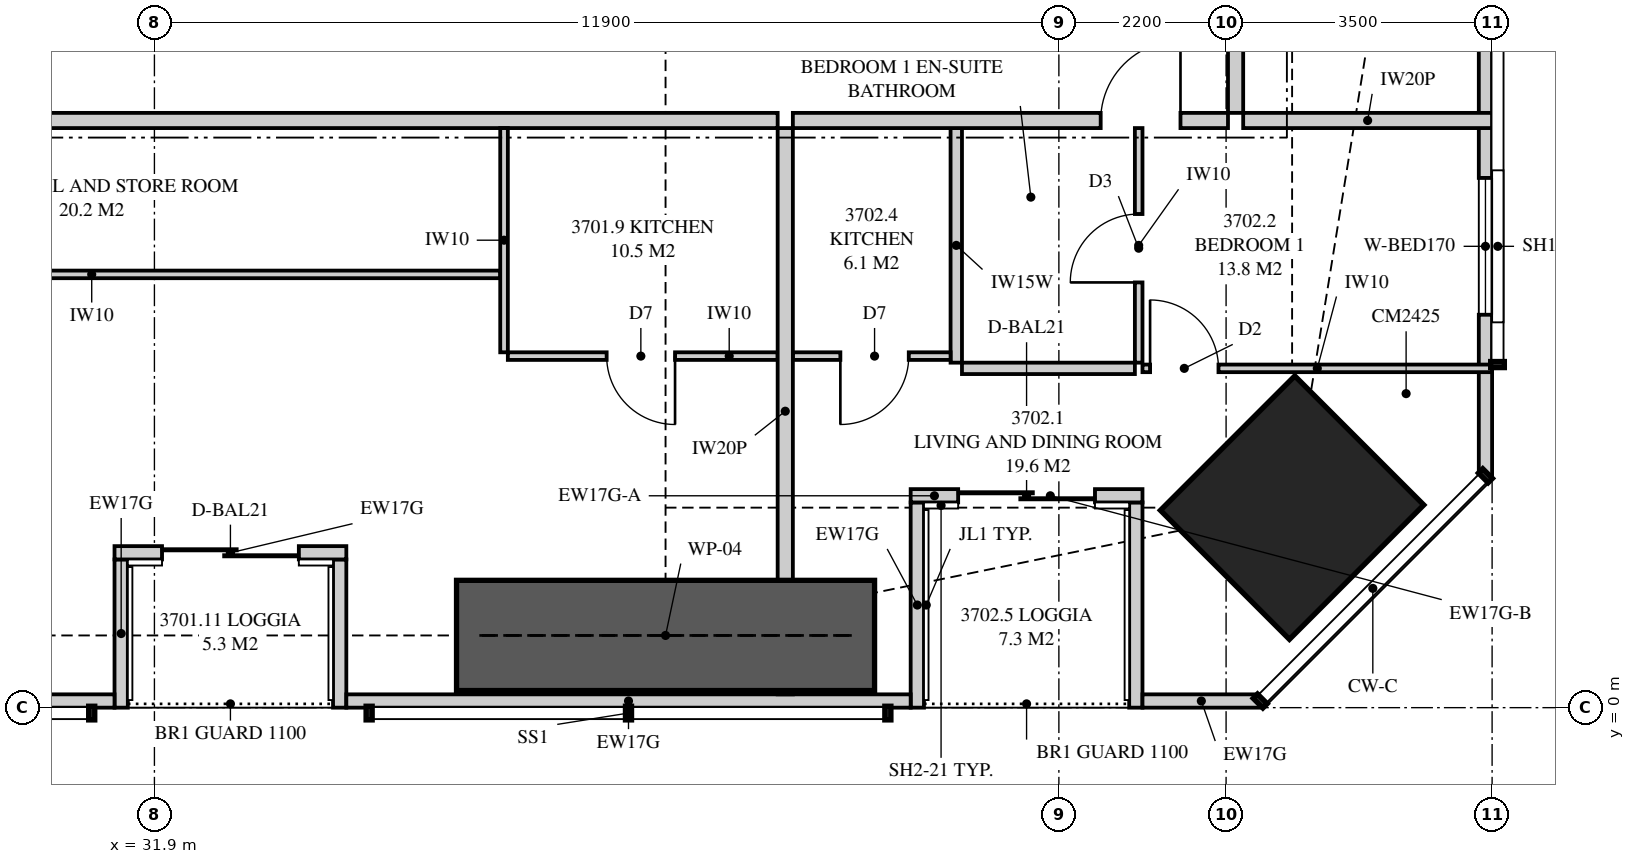
"""IFC4 building model, lengths in metres.
Left out: names, types, materials, properties, quantities, classifications, styles, units other than length and angle.
Written with IfcOpenShell. Run it as: python <this file> out.ifc"""

import sys

from ifc_helpers import new_model, si_unit, direction, frame, frame_2d, origin, origin_2d, place, context, subcontext, project, spatial, polyline, rectangle, outline, extrude, element, fill, save


model = new_model("IFC4")
c1 = context("Model", 3, precision=1e-05, world=origin(), true_north=direction((0.0, 1.0)))
c2 = subcontext(c1, "Body", "Model", "MODEL_VIEW")
j1 = project(units=[si_unit("LENGTHUNIT", "METRE"), si_unit("PLANEANGLEUNIT", "RADIAN")], contexts=[c1])
p1 = place(None, origin())
s1 = spatial("IfcSite", under=j1, at=p1, CompositionType="ELEMENT")
p2 = place(p1, origin())
s2 = spatial("IfcBuilding", under=s1, at=p2, CompositionType="ELEMENT")
p3 = place(p2, frame((0.0, 0.0, 135.0)))
s3 = spatial("IfcBuildingStorey", under=s2, at=p3, CompositionType="ELEMENT", Elevation=135.0)
p4 = place(p3, frame((46.869, 2.631, 0.0), z_axis=(0.0, 0.0, 1.0), x_axis=(-0.707106781187, 0.707106781187, 0.0)))
e1 = element("IfcColumn", 1, at=p4, inside=s3, PredefinedType="COLUMN", context=c2, shape_type="SweptSolid", body=[
    extrude(rectangle(XDim=2.4, YDim=2.5, at=origin_2d()), origin(), (0.0, 0.0, 1.0), 3.35),
])
p5 = place(p3, frame((9.051, 0.087, 0.0), z_axis=(0.0, 0.0, 1.0), x_axis=(1.0, 0.0, 0.0)))
e2 = element("IfcWall", 2, at=p5, inside=s3, PredefinedType="SOLIDWALL", context=c2, shape_type="SweptSolid", body=[
    extrude(outline(polyline([(0.0, 0.0), (22.324, 0.0), (22.324, 2.15), (7.824, 2.15), (7.824, 3.11), (7.666, 3.11), (7.666, 2.15), (7.62, 2.15), (7.62, 3.11), (0.0, 3.11), (0.0, 0.0)])), frame((0.0, 0.087, 0.0), z_axis=(0.0, -1.0, 0.0), x_axis=(1.0, 0.0, 0.0)), (0.0, 0.0, 1.0), 0.175),
])
p6 = place(p5, frame((3.134, 0.0, 0.4)))
e3 = element("IfcOpeningElement", 3, at=p6, cuts=e2, PredefinedType="OPENING", context=c2, shape_type="SweptSolid", body=[
    extrude(rectangle(XDim=1.8, YDim=1.7, at=frame_2d((0.9, 0.85))), frame((0.0, 0.097, 0.0), z_axis=(0.0, -1.0, 0.0), x_axis=(1.0, 0.0, 0.0)), (0.0, 0.0, 1.0), 0.195),
])
p7 = place(p5, frame((10.706, 0.0, 0.4)))
e4 = element("IfcOpeningElement", 4, at=p7, cuts=e2, PredefinedType="OPENING", context=c2, shape_type="SweptSolid", body=[
    extrude(rectangle(XDim=1.8, YDim=1.7, at=frame_2d((0.9, 0.85))), frame((0.0, 0.097, 0.0), z_axis=(0.0, -1.0, 0.0), x_axis=(1.0, 0.0, 0.0)), (0.0, 0.0, 1.0), 0.195),
])
p8 = place(p5, frame((13.874, 0.0, 0.4)))
e5 = element("IfcOpeningElement", 5, at=p8, cuts=e2, PredefinedType="OPENING", context=c2, shape_type="SweptSolid", body=[
    extrude(rectangle(XDim=1.8, YDim=1.7, at=frame_2d((0.9, 0.85))), frame((0.0, 0.097, 0.0), z_axis=(0.0, -1.0, 0.0), x_axis=(1.0, 0.0, 0.0)), (0.0, 0.0, 1.0), 0.195),
])
p9 = place(p3, frame((34.425, 0.087, 0.0), z_axis=(0.0, 0.0, 1.0), x_axis=(1.0, 0.0, 0.0)))
e6 = element("IfcWall", 6, at=p9, inside=s3, PredefinedType="SOLIDWALL", context=c2, shape_type="SweptSolid", body=[
    extrude(outline(polyline([(0.0, 0.0), (7.425, 0.0), (7.425, 3.11), (4.403, 3.11), (4.403, 2.15), (4.358, 2.15), (4.358, 3.11), (4.2, 3.11), (4.2, 2.15), (0.0, 2.15), (0.0, 0.0)])), frame((0.0, 0.087, 0.0), z_axis=(0.0, -1.0, 0.0), x_axis=(1.0, 0.0, 0.0)), (0.0, 0.0, 1.0), 0.175),
])
p10 = place(p3, frame((44.9, 0.087, 0.0), z_axis=(0.0, 0.0, 1.0), x_axis=(1.0, 0.0, 0.0)))
e7 = element("IfcWall", 7, at=p10, inside=s3, PredefinedType="SOLIDWALL", context=c2, shape_type="SweptSolid", body=[
    extrude(rectangle(XDim=1.549, YDim=0.175, at=frame_2d((0.774, 0.0))), origin(), (0.0, 0.0, 1.0), 3.11),
])
p11 = place(p3, frame((31.375, 2.038, 0.0), z_axis=(0.0, 0.0, 1.0), x_axis=(1.0, 0.0, 0.0)))
e8 = element("IfcWall", 8, at=p11, inside=s3, PredefinedType="SOLIDWALL", context=c2, shape_type="SweptSolid", body=[
    extrude(rectangle(XDim=3.05, YDim=0.175, at=frame_2d((1.525, 0.0))), origin(), (0.0, 0.0, 1.0), 3.11),
])
p12 = place(p11, frame((0.625, 0.0, 0.0)))
e9 = element("IfcOpeningElement", 9, at=p12, cuts=e8, PredefinedType="OPENING", context=c2, shape_type="SweptSolid", body=[
    extrude(rectangle(XDim=1.8, YDim=2.1, at=frame_2d((0.9, 1.05))), frame((0.0, 0.097, 0.0), z_axis=(0.0, -1.0, 0.0), x_axis=(1.0, 0.0, 0.0)), (0.0, 0.0, 1.0), 0.195),
])
for number, where, z_axis, x_axis in (
    (10, (31.462, 0.0, 0.0), (0.0, 0.0, 1.0), (0.0, 1.0, 0.0)),
    (11, (34.337, 0.0, 0.0), (0.0, 0.0, 1.0), (0.0, 1.0, 0.0)),
):
    element("IfcWall", number, at=place(p3, frame(where, z_axis=z_axis, x_axis=x_axis)), inside=s3, PredefinedType="SOLIDWALL", context=c2, shape_type="SweptSolid", body=[
        extrude(outline(polyline([(0.0, 0.0), (1.95, 0.0), (1.95, 3.11), (1.75, 3.11), (1.75, 2.15), (0.15, 2.15), (0.15, 3.11), (0.0, 3.11), (0.0, 0.0)])), frame((0.0, 0.087, 0.0), z_axis=(0.0, -1.0, 0.0), x_axis=(1.0, 0.0, 0.0)), (0.0, 0.0, 1.0), 0.175),
    ])
p13 = place(p3, frame((41.85, 2.788, 0.0), z_axis=(0.0, 0.0, 1.0), x_axis=(1.0, 0.0, 0.0)))
e12 = element("IfcWall", 12, at=p13, inside=s3, PredefinedType="SOLIDWALL", context=c2, shape_type="SweptSolid", body=[
    extrude(rectangle(XDim=0.625, YDim=0.175, at=frame_2d((0.312, 0.0))), origin(), (0.0, 0.0, 1.0), 2.51),
])
p14 = place(p3, frame((42.475, 2.788, 0.0), z_axis=(0.0, 0.0, 1.0), x_axis=(1.0, 0.0, 0.0)))
e13 = element("IfcWall", 13, at=p14, inside=s3, PredefinedType="SOLIDWALL", context=c2, shape_type="SweptSolid", body=[
    extrude(rectangle(XDim=2.425, YDim=0.175, at=frame_2d((1.212, 0.0))), origin(), (0.0, 0.0, 1.0), 2.15),
])
p15 = place(p14, origin())
e14 = element("IfcOpeningElement", 14, at=p15, cuts=e13, PredefinedType="OPENING", context=c2, shape_type="SweptSolid", body=[
    extrude(rectangle(XDim=1.8, YDim=2.1, at=frame_2d((0.9, 1.05))), frame((0.0, 0.097, 0.0), z_axis=(0.0, -1.0, 0.0), x_axis=(1.0, 0.0, 0.0)), (0.0, 0.0, 1.0), 0.195),
])
p16 = place(p3, frame((41.938, 0.0, 0.0), z_axis=(0.0, 0.0, 1.0), x_axis=(0.0, 1.0, 0.0)))
e15 = element("IfcWall", 15, at=p16, inside=s3, PredefinedType="SOLIDWALL", context=c2, shape_type="SweptSolid", body=[
    extrude(outline(polyline([(0.0, 0.0), (2.7, 0.0), (2.7, 2.51), (2.46, 2.51), (2.46, 2.15), (0.791, 2.15), (0.791, 3.11), (0.0, 3.11), (0.0, 0.0)])), frame((0.0, 0.087, 0.0), z_axis=(0.0, -1.0, 0.0), x_axis=(1.0, 0.0, 0.0)), (0.0, 0.0, 1.0), 0.175),
])
p17 = place(p3, frame((44.812, 0.0, 0.0), z_axis=(0.0, 0.0, 1.0), x_axis=(0.0, 1.0, 0.0)))
e16 = element("IfcWall", 16, at=p17, inside=s3, PredefinedType="SOLIDWALL", context=c2, shape_type="SweptSolid", body=[
    extrude(outline(polyline([(0.0, 0.0), (2.7, 0.0), (2.7, 2.15), (1.378, 2.15), (1.378, 3.11), (0.0, 3.11), (0.0, 0.0)])), frame((0.0, 0.087, 0.0), z_axis=(0.0, -1.0, 0.0), x_axis=(1.0, 0.0, 0.0)), (0.0, 0.0, 1.0), 0.175),
])
p18 = place(p3, frame((49.413, 3.051, 0.0), z_axis=(0.0, 0.0, 1.0), x_axis=(0.0, 1.0, 0.0)))
e17 = element("IfcWall", 17, at=p18, inside=s3, PredefinedType="SOLIDWALL", context=c2, shape_type="SweptSolid", body=[
    extrude(outline(polyline([(0.0, 0.0), (31.897, 0.0), (31.897, 3.11), (22.167, 3.11), (22.167, 2.15), (22.074, 2.15), (22.074, 3.11), (21.949, 3.11), (21.949, 2.15), (9.949, 2.15), (9.949, 3.11), (9.823, 3.11), (9.823, 2.15), (9.73, 2.15), (9.73, 3.11), (0.0, 3.11), (0.0, 0.0)])), frame((0.0, 0.087, 0.0), z_axis=(0.0, -1.0, 0.0), x_axis=(1.0, 0.0, 0.0)), (0.0, 0.0, 1.0), 0.175),
])
p19 = place(p18, frame((2.118, 0.0, 0.4)))
e18 = element("IfcOpeningElement", 18, at=p19, cuts=e17, PredefinedType="OPENING", context=c2, shape_type="SweptSolid", body=[
    extrude(rectangle(XDim=1.8, YDim=1.7, at=frame_2d((0.9, 0.85))), frame((0.0, 0.097, 0.0), z_axis=(0.0, -1.0, 0.0), x_axis=(1.0, 0.0, 0.0)), (0.0, 0.0, 1.0), 0.195),
])
p20 = place(p18, frame((14.849, 0.0, 0.4)))
e19 = element("IfcOpeningElement", 19, at=p20, cuts=e17, PredefinedType="OPENING", context=c2, shape_type="SweptSolid", body=[
    extrude(rectangle(XDim=1.2, YDim=1.7, at=frame_2d((0.6, 0.85))), frame((0.0, 0.097, 0.0), z_axis=(0.0, -1.0, 0.0), x_axis=(1.0, 0.0, 0.0)), (0.0, 0.0, 1.0), 0.195),
])
p21 = place(p18, frame((28.51, 0.0, 0.4)))
e20 = element("IfcOpeningElement", 20, at=p21, cuts=e17, PredefinedType="OPENING", context=c2, shape_type="SweptSolid", body=[
    extrude(rectangle(XDim=1.2, YDim=1.7, at=frame_2d((0.6, 0.85))), frame((0.0, 0.097, 0.0), z_axis=(0.0, -1.0, 0.0), x_axis=(1.0, 0.0, 0.0)), (0.0, 0.0, 1.0), 0.195),
])
p22 = place(p3, frame((40.2, 0.175, 0.0), z_axis=(0.0, 0.0, 1.0), x_axis=(0.0, 1.0, 0.0)))
e21 = element("IfcWall", 21, at=p22, inside=s3, PredefinedType="PARTITIONING", context=c2, shape_type="SweptSolid", body=[
    extrude(outline(polyline([(0.167, 3.11), (0.0, 3.11), (0.0, 0.0), (0.529, 0.0), (0.529, 0.427), (1.021, 0.427), (1.021, 0.0), (7.45, 0.0), (7.45, 3.11), (3.766, 3.11), (3.766, 2.51), (2.025, 2.51), (2.025, 2.15), (1.021, 2.15), (1.021, 1.723), (0.529, 1.723), (0.529, 2.15), (0.167, 2.15), (0.167, 3.11)])), frame((0.0, 0.1, 0.0), z_axis=(0.0, -1.0, 0.0), x_axis=(1.0, 0.0, 0.0)), (0.0, 0.0, 1.0), 0.2),
])
p23 = place(p3, frame((17.775, 7.725, 0.0), z_axis=(0.0, 0.0, 1.0), x_axis=(1.0, 0.0, 0.0)))
e22 = element("IfcWall", 22, at=p23, inside=s3, PredefinedType="PARTITIONING", context=c2, shape_type="SweptSolid", body=[
    extrude(outline(polyline([(0.0, 0.0), (22.325, 0.0), (22.325, 3.11), (21.187, 3.11), (21.187, 2.541), (20.513, 2.541), (20.513, 3.11), (10.312, 3.11), (10.312, 2.541), (9.638, 2.541), (9.638, 3.11), (0.0, 3.11), (0.0, 0.0)])), frame((0.0, 0.1, 0.0), z_axis=(0.0, -1.0, 0.0), x_axis=(1.0, 0.0, 0.0)), (0.0, 0.0, 1.0), 0.2),
])
p24 = place(p23, frame((4.825, 0.0, 0.0)))
e23 = element("IfcOpeningElement", 23, at=p24, cuts=e22, PredefinedType="OPENING", context=c2, shape_type="SweptSolid", body=[
    extrude(rectangle(XDim=1.05, YDim=2.2, at=frame_2d((0.525, 1.1))), frame((0.0, 0.11, 0.0), z_axis=(0.0, -1.0, 0.0), x_axis=(1.0, 0.0, 0.0)), (0.0, 0.0, 1.0), 0.22),
])
p25 = place(p3, frame((36.55, 4.625, 0.0), z_axis=(0.0, 0.0, 1.0), x_axis=(1.0, 0.0, 0.0)))
e24 = element("IfcWall", 24, at=p25, inside=s3, PredefinedType="PARTITIONING", context=c2, shape_type="SweptSolid", body=[
    extrude(outline(polyline([(0.0, 0.0), (3.55, 0.0), (3.55, 3.11), (2.362, 3.11), (2.362, 2.541), (1.788, 2.541), (1.788, 3.11), (0.0, 3.11), (0.0, 0.0)])), frame((0.0, 0.05, 0.0), z_axis=(0.0, -1.0, 0.0), x_axis=(1.0, 0.0, 0.0)), (0.0, 0.0, 1.0), 0.1),
])
p26 = place(p25, frame((1.3, 0.0, 0.0)))
e25 = element("IfcOpeningElement", 25, at=p26, cuts=e24, PredefinedType="OPENING", context=c2, shape_type="SweptSolid", body=[
    extrude(rectangle(XDim=0.9, YDim=2.1, at=frame_2d((0.45, 1.05))), frame((0.0, 0.06, 0.0), z_axis=(0.0, -1.0, 0.0), x_axis=(1.0, 0.0, 0.0)), (0.0, 0.0, 1.0), 0.12),
])
p27 = place(p3, frame((36.5, 4.675, 0.0), z_axis=(0.0, 0.0, 1.0), x_axis=(0.0, 1.0, 0.0)))
e26 = element("IfcWall", 26, at=p27, inside=s3, PredefinedType="PARTITIONING", context=c2, shape_type="SweptSolid", body=[
    extrude(rectangle(XDim=2.95, YDim=0.1, at=frame_2d((1.475, 0.0))), origin(), (0.0, 0.0, 1.0), 3.11),
])
p28 = place(p3, frame((25.7, 5.7, 0.0), z_axis=(0.0, 0.0, 1.0), x_axis=(1.0, 0.0, 0.0)))
e27 = element("IfcWall", 27, at=p28, inside=s3, PredefinedType="PARTITIONING", context=c2, shape_type="SweptSolid", body=[
    extrude(outline(polyline([(0.0, 0.0), (10.75, 0.0), (10.75, 3.11), (2.337, 3.11), (2.337, 2.541), (1.763, 2.541), (1.763, 3.11), (0.0, 3.11), (0.0, 0.0)])), frame((0.0, 0.05, 0.0), z_axis=(0.0, -1.0, 0.0), x_axis=(1.0, 0.0, 0.0)), (0.0, 0.0, 1.0), 0.1),
])
p29 = place(p28, frame((0.3, 0.0, 0.0)))
e28 = element("IfcOpeningElement", 28, at=p29, cuts=e27, PredefinedType="OPENING", context=c2, shape_type="SweptSolid", body=[
    extrude(rectangle(XDim=1.0, YDim=2.1, at=frame_2d((0.5, 1.05))), frame((0.0, 0.06, 0.0), z_axis=(0.0, -1.0, 0.0), x_axis=(1.0, 0.0, 0.0)), (0.0, 0.0, 1.0), 0.12),
])
p30 = place(p3, frame((40.3, 7.725, 0.0), z_axis=(0.0, 0.0, 1.0), x_axis=(1.0, 0.0, 0.0)))
e29 = element("IfcWall", 29, at=p30, inside=s3, PredefinedType="PARTITIONING", context=c2, shape_type="SweptSolid", body=[
    extrude(rectangle(XDim=5.725, YDim=0.2, at=frame_2d((2.862, 0.0))), origin(), (0.0, 0.0, 1.0), 3.11),
])
p31 = place(p30, frame((4.05, 0.0, 0.0)))
e30 = element("IfcOpeningElement", 30, at=p31, cuts=e29, PredefinedType="OPENING", context=c2, shape_type="SweptSolid", body=[
    extrude(rectangle(XDim=1.05, YDim=2.2, at=frame_2d((0.525, 1.1))), frame((0.0, 0.11, 0.0), z_axis=(0.0, -1.0, 0.0), x_axis=(1.0, 0.0, 0.0)), (0.0, 0.0, 1.0), 0.22),
])
p32 = place(p3, frame((44.85, 4.539, 0.0), z_axis=(0.0, 0.0, 1.0), x_axis=(0.0, 1.0, 0.0)))
e31 = element("IfcWall", 31, at=p32, inside=s3, PredefinedType="PARTITIONING", context=c2, shape_type="SweptSolid", body=[
    extrude(rectangle(XDim=3.086, YDim=0.1, at=frame_2d((1.543, 0.0))), origin(), (0.0, 0.0, 1.0), 3.11),
])
p33 = place(p32, frame((1.056, 0.0, 0.0)))
e32 = element("IfcOpeningElement", 32, at=p33, cuts=e31, PredefinedType="OPENING", context=c2, shape_type="SweptSolid", body=[
    extrude(rectangle(XDim=0.9, YDim=2.1, at=frame_2d((0.45, 1.05))), frame((0.0, 0.06, 0.0), z_axis=(0.0, -1.0, 0.0), x_axis=(1.0, 0.0, 0.0)), (0.0, 0.0, 1.0), 0.12),
])
p34 = place(p3, frame((44.9, 4.464, 0.0), z_axis=(0.0, 0.0, 1.0), x_axis=(1.0, 0.0, 0.0)))
e33 = element("IfcWall", 33, at=p34, inside=s3, PredefinedType="PARTITIONING", context=c2, shape_type="SweptSolid", body=[
    extrude(outline(polyline([(0.0, 0.0), (4.6, 0.0), (4.6, 3.11), (3.137, 3.11), (3.137, 2.15), (1.395, 2.15), (1.395, 3.11), (0.0, 3.11), (0.0, 0.0)])), frame((0.0, 0.05, 0.0), z_axis=(0.0, -1.0, 0.0), x_axis=(1.0, 0.0, 0.0)), (0.0, 0.0, 1.0), 0.1),
])
p35 = place(p34, frame((0.1, 0.0, 0.0)))
e34 = element("IfcOpeningElement", 34, at=p35, cuts=e33, PredefinedType="OPENING", context=c2, shape_type="SweptSolid", body=[
    extrude(rectangle(XDim=0.9, YDim=2.1, at=frame_2d((0.45, 1.05))), frame((0.0, 0.06, 0.0), z_axis=(0.0, -1.0, 0.0), x_axis=(1.0, 0.0, 0.0)), (0.0, 0.0, 1.0), 0.12),
])
p36 = place(p3, frame((42.525, 4.464, 0.0), z_axis=(0.0, 0.0, 1.0), x_axis=(1.0, 0.0, 0.0)))
e35 = element("IfcWall", 35, at=p36, inside=s3, PredefinedType="PLUMBINGWALL", context=c2, shape_type="SweptSolid", body=[
    extrude(rectangle(XDim=2.275, YDim=0.15, at=frame_2d((1.138, 0.0))), origin(), (0.0, 0.0, 1.0), 3.11),
])
p37 = place(p3, frame((42.45, 4.539, 0.0), z_axis=(0.0, 0.0, 1.0), x_axis=(0.0, 1.0, 0.0)))
e36 = element("IfcWall", 36, at=p37, inside=s3, PredefinedType="PLUMBINGWALL", context=c2, shape_type="SweptSolid", body=[
    extrude(rectangle(XDim=3.086, YDim=0.15, at=frame_2d((1.543, 0.0))), origin(), (0.0, 0.0, 1.0), 3.11),
])
p38 = place(p3, frame((40.3, 4.625, 0.0), z_axis=(0.0, 0.0, 1.0), x_axis=(1.0, 0.0, 0.0)))
e37 = element("IfcWall", 37, at=p38, inside=s3, PredefinedType="PARTITIONING", context=c2, shape_type="SweptSolid", body=[
    extrude(rectangle(XDim=2.075, YDim=0.1, at=frame_2d((1.038, 0.0))), origin(), (0.0, 0.0, 1.0), 3.11),
])
p39 = place(p38, frame((0.625, 0.0, 0.0)))
e38 = element("IfcOpeningElement", 38, at=p39, cuts=e37, PredefinedType="OPENING", context=c2, shape_type="SweptSolid", body=[
    extrude(rectangle(XDim=0.9, YDim=2.1, at=frame_2d((0.45, 1.05))), frame((0.0, 0.06, 0.0), z_axis=(0.0, -1.0, 0.0), x_axis=(1.0, 0.0, 0.0)), (0.0, 0.0, 1.0), 0.12),
])
p40 = place(p3, frame((46.225, 7.725, 0.0), z_axis=(0.0, 0.0, 1.0), x_axis=(1.0, 0.0, 0.0)))
e39 = element("IfcWall", 39, at=p40, inside=s3, PredefinedType="PARTITIONING", context=c2, shape_type="SweptSolid", body=[
    extrude(outline(polyline([(0.0, 0.0), (3.275, 0.0), (3.275, 3.11), (2.392, 3.11), (2.392, 2.15), (0.643, 2.15), (0.643, 2.541), (0.306, 2.541), (0.306, 3.11), (0.0, 3.11), (0.0, 0.0)])), frame((0.0, 0.1, 0.0), z_axis=(0.0, -1.0, 0.0), x_axis=(1.0, 0.0, 0.0)), (0.0, 0.0, 1.0), 0.2),
])
p41 = place(p3, frame((46.125, 7.825, 0.0), z_axis=(0.0, 0.0, 1.0), x_axis=(0.0, 1.0, 0.0)))
e40 = element("IfcWall", 40, at=p41, inside=s3, PredefinedType="PARTITIONING", context=c2, shape_type="SweptSolid", body=[
    extrude(outline(polyline([(0.0, 0.0), (21.35, 0.0), (21.35, 3.11), (17.512, 3.11), (17.512, 2.541), (16.838, 2.541), (16.838, 3.11), (5.512, 3.11), (5.512, 2.541), (4.838, 2.541), (4.838, 3.11), (0.0, 3.11), (0.0, 0.0)])), frame((0.0, 0.1, 0.0), z_axis=(0.0, -1.0, 0.0), x_axis=(1.0, 0.0, 0.0)), (0.0, 0.0, 1.0), 0.2),
])
p42 = place(p41, frame((9.775, 0.0, 0.0)))
e41 = element("IfcOpeningElement", 41, at=p42, cuts=e40, PredefinedType="OPENING", context=c2, shape_type="SweptSolid", body=[
    extrude(rectangle(XDim=1.8, YDim=2.1, at=frame_2d((0.9, 1.05))), frame((0.0, 0.11, 0.0), z_axis=(0.0, -1.0, 0.0), x_axis=(1.0, 0.0, 0.0)), (0.0, 0.0, 1.0), 0.22),
])
p43 = place(p41, frame((19.5, 0.0, 0.0)))
e42 = element("IfcOpeningElement", 42, at=p43, cuts=e40, PredefinedType="OPENING", context=c2, shape_type="SweptSolid", body=[
    extrude(rectangle(XDim=1.0, YDim=2.1, at=frame_2d((0.5, 1.05))), frame((0.0, 0.11, 0.0), z_axis=(0.0, -1.0, 0.0), x_axis=(1.0, 0.0, 0.0)), (0.0, 0.0, 1.0), 0.22),
])
p44 = place(p3, frame((35.875, 0.95, 0.0), z_axis=(0.0, 0.0, 1.0), x_axis=(1.0, 0.0, 0.0)))
e43 = element("IfcWall", 43, at=p44, inside=s3, PredefinedType="SHEAR", context=c2, shape_type="SweptSolid", body=[
    extrude(rectangle(XDim=5.5, YDim=1.45, at=frame_2d((2.75, 0.0))), origin(), (0.0, 0.0, 1.0), 3.35),
])
p45 = place(p12, origin())
e44 = element("IfcDoor", 44, at=p45, inside=s3, OperationType="SLIDING_TO_LEFT", PredefinedType="DOOR", context=c2, shape_type="SweptSolid", body=[
    extrude(rectangle(XDim=1.8, YDim=2.1, at=frame_2d((0.9, 1.05))), frame((0.0, 0.025, 0.0), z_axis=(0.0, -1.0, 0.0), x_axis=(1.0, 0.0, 0.0)), (0.0, 0.0, 1.0), 0.05),
])
fill(e9, e44)
p46 = place(p15, origin())
e45 = element("IfcDoor", 45, at=p46, inside=s3, OperationType="SLIDING_TO_LEFT", PredefinedType="DOOR", context=c2, shape_type="SweptSolid", body=[
    extrude(rectangle(XDim=1.8, YDim=2.1, at=frame_2d((0.9, 1.05))), frame((0.0, 0.025, 0.0), z_axis=(0.0, -1.0, 0.0), x_axis=(1.0, 0.0, 0.0)), (0.0, 0.0, 1.0), 0.05),
])
fill(e14, e45)
p47 = place(p19, origin())
e46 = element("IfcWindow", 46, at=p47, inside=s3, PartitioningType="SINGLE_PANEL", PredefinedType="WINDOW", context=c2, shape_type="SweptSolid", body=[
    extrude(rectangle(XDim=1.8, YDim=1.7, at=frame_2d((0.9, 0.85))), frame((0.0, 0.03, 0.0), z_axis=(0.0, -1.0, 0.0), x_axis=(1.0, 0.0, 0.0)), (0.0, 0.0, 1.0), 0.06),
])
fill(e18, e46)
p48 = place(p26, frame((0.9, 0.0, 0.0), z_axis=(0.0, 0.0, 1.0), x_axis=(-1.0, 0.0, 0.0)))
e47 = element("IfcDoor", 47, at=p48, inside=s3, OperationType="SINGLE_SWING_LEFT", PredefinedType="DOOR", context=c2, shape_type="SweptSolid", body=[
    extrude(rectangle(XDim=0.9, YDim=2.1, at=frame_2d((0.45, 1.05))), frame((0.0, 0.025, 0.0), z_axis=(0.0, -1.0, 0.0), x_axis=(1.0, 0.0, 0.0)), (0.0, 0.0, 1.0), 0.05),
])
fill(e25, e47)
p49 = place(p31, origin())
e48 = element("IfcDoor", 48, at=p49, inside=s3, OperationType="SINGLE_SWING_RIGHT", PredefinedType="DOOR", context=c2, shape_type="SweptSolid", body=[
    extrude(rectangle(XDim=1.05, YDim=2.2, at=frame_2d((0.525, 1.1))), frame((0.0, 0.025, 0.0), z_axis=(0.0, -1.0, 0.0), x_axis=(1.0, 0.0, 0.0)), (0.0, 0.0, 1.0), 0.05),
])
fill(e30, e48)
p50 = place(p35, origin())
e49 = element("IfcDoor", 49, at=p50, inside=s3, OperationType="SINGLE_SWING_LEFT", PredefinedType="DOOR", context=c2, shape_type="SweptSolid", body=[
    extrude(rectangle(XDim=0.9, YDim=2.1, at=frame_2d((0.45, 1.05))), frame((0.0, 0.025, 0.0), z_axis=(0.0, -1.0, 0.0), x_axis=(1.0, 0.0, 0.0)), (0.0, 0.0, 1.0), 0.05),
])
fill(e34, e49)
p51 = place(p33, origin())
e50 = element("IfcDoor", 50, at=p51, inside=s3, OperationType="SINGLE_SWING_LEFT", PredefinedType="DOOR", context=c2, shape_type="SweptSolid", body=[
    extrude(rectangle(XDim=0.9, YDim=2.1, at=frame_2d((0.45, 1.05))), frame((0.0, 0.025, 0.0), z_axis=(0.0, -1.0, 0.0), x_axis=(1.0, 0.0, 0.0)), (0.0, 0.0, 1.0), 0.05),
])
fill(e32, e50)
p52 = place(p39, frame((0.9, 0.0, 0.0), z_axis=(0.0, 0.0, 1.0), x_axis=(-1.0, 0.0, 0.0)))
e51 = element("IfcDoor", 51, at=p52, inside=s3, OperationType="SINGLE_SWING_RIGHT", PredefinedType="DOOR", context=c2, shape_type="SweptSolid", body=[
    extrude(rectangle(XDim=0.9, YDim=2.1, at=frame_2d((0.45, 1.05))), frame((0.0, 0.025, 0.0), z_axis=(0.0, -1.0, 0.0), x_axis=(1.0, 0.0, 0.0)), (0.0, 0.0, 1.0), 0.05),
])
fill(e38, e51)
save(model, sys.argv[1])
